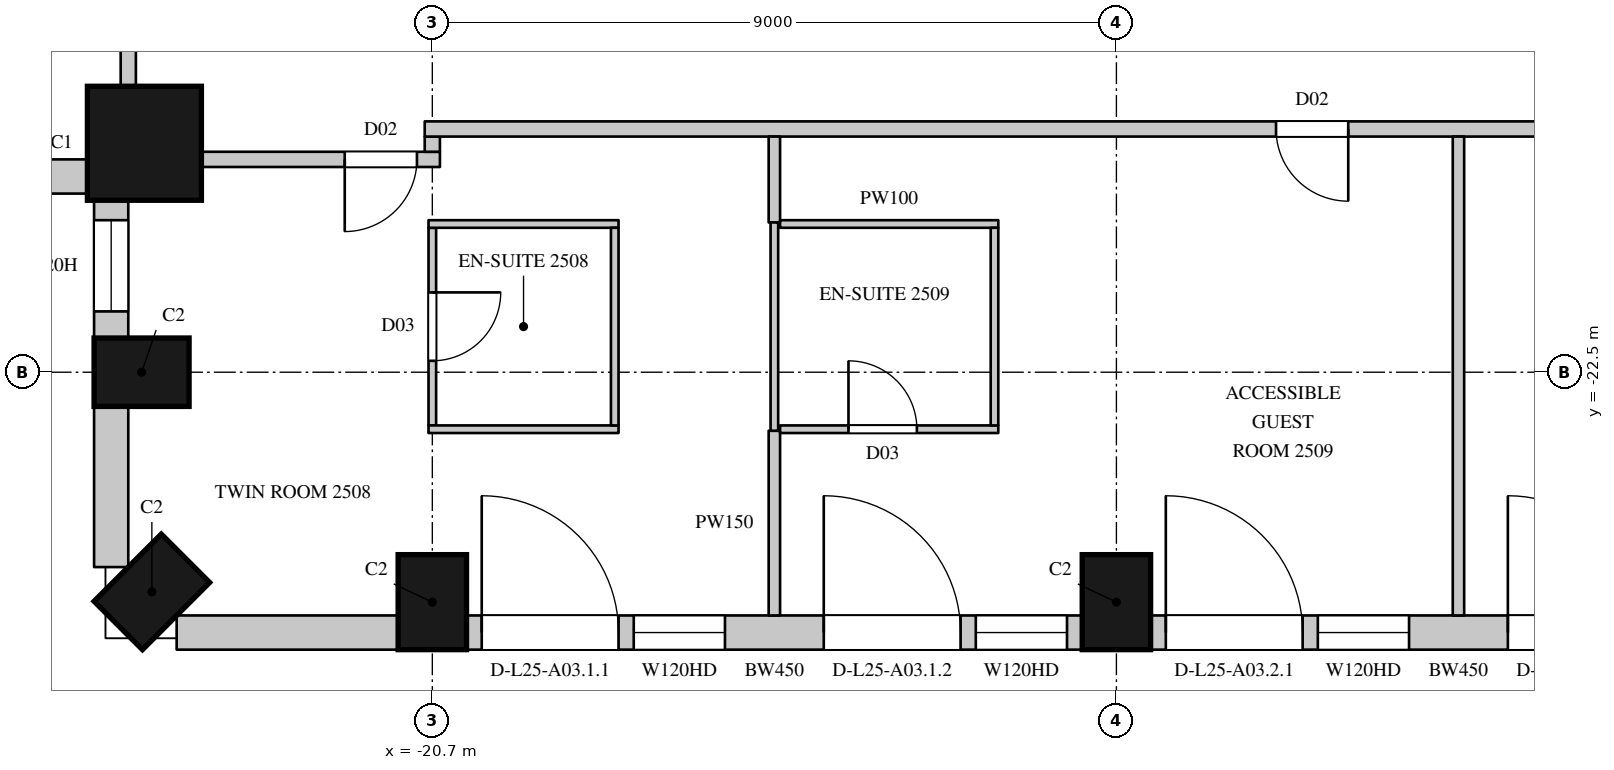
"""IFC4 building model, lengths in metres.
Left out: names, types, materials, properties, quantities, classifications, styles, units other than length and angle.
Written with IfcOpenShell. Run it as: python <this file> out.ifc"""

import sys

from ifc_helpers import new_model, si_unit, direction, frame, frame_2d, origin, origin_2d, place, context, subcontext, project, spatial, rectangle, circle, extrude, element, fill, save


model = new_model("IFC4")
c1 = context("Model", 3, precision=1e-05, world=origin(), true_north=direction((0.0, 1.0)))
c2 = subcontext(c1, "Body", "Model", "MODEL_VIEW")
j1 = project(units=[si_unit("LENGTHUNIT", "METRE"), si_unit("PLANEANGLEUNIT", "RADIAN")], contexts=[c1])
p1 = place(None, origin())
s1 = spatial("IfcSite", under=j1, at=p1, CompositionType="ELEMENT")
p2 = place(p1, origin())
s2 = spatial("IfcBuilding", under=s1, at=p2, CompositionType="ELEMENT")
p3 = place(p2, frame((0.0, 0.0, 120.3)))
s3 = spatial("IfcBuildingStorey", under=s2, at=p3, CompositionType="ELEMENT", Elevation=120.3)
p4 = place(p3, frame((-24.488, -19.488, 0.0), z_axis=(0.0, 0.0, 1.0), x_axis=(1.0, 0.0, 0.0)))
e1 = element("IfcColumn", 1, at=p4, inside=s3, PredefinedType="COLUMN", context=c2, shape_type="SweptSolid", body=[
    extrude(circle(Radius=0.75, at=origin_2d()), origin(), (0.0, 0.0, 1.0), 3.6),
])
for number, where, z_axis, x_axis in (
    (2, (-24.525, -22.5, 0.0), (0.0, 0.0, 1.0), (0.0, -1.0, 0.0)),
    (3, (-24.39, -25.39, 0.0), (0.0, 0.0, 1.0), (0.707, -0.707, 0.0)),
    (4, (-20.7, -25.525, 0.0), (0.0, 0.0, 1.0), (1.0, 0.0, 0.0)),
    (5, (-11.7, -25.525, 0.0), (0.0, 0.0, 1.0), (1.0, 0.0, 0.0)),
):
    element("IfcColumn", number, at=place(p3, frame(where, z_axis=z_axis, x_axis=x_axis)), inside=s3, PredefinedType="COLUMN", context=c2, shape_type="SweptSolid", body=[
        extrude(rectangle(XDim=0.9, YDim=1.25, at=origin_2d()), origin(), (0.0, 0.0, 1.0), 3.6),
    ])
p5 = place(p3, frame((-29.064, -19.925, 0.0), z_axis=(0.0, 0.0, 1.0), x_axis=(1.0, 0.0, 0.0)))
e6 = element("IfcWall", 6, at=p5, inside=s3, PredefinedType="SOLIDWALL", context=c2, shape_type="SweptSolid", body=[
    extrude(rectangle(XDim=3.857, YDim=0.45, at=frame_2d((1.928, 0.0))), origin(), (0.0, 0.0, 1.0), 3.3),
])
p6 = place(p5, frame((0.514, 0.0, 1.05)))
e7 = element("IfcOpeningElement", 7, at=p6, cuts=e6, PredefinedType="OPENING", context=c2, shape_type="SweptSolid", body=[
    extrude(rectangle(XDim=2.7, YDim=2.0, at=frame_2d((1.35, 1.0))), frame((0.0, 0.235, 0.0), z_axis=(0.0, -1.0, 0.0), x_axis=(1.0, 0.0, 0.0)), (0.0, 0.0, 1.0), 0.47),
])
p7 = place(p3, frame((-24.925, -20.207, 0.0), z_axis=(0.0, 0.0, 1.0), x_axis=(0.0, -1.0, 0.0)))
e8 = element("IfcWall", 8, at=p7, inside=s3, PredefinedType="SOLIDWALL", context=c2, shape_type="SweptSolid", body=[
    extrude(rectangle(XDim=1.843, YDim=0.45, at=frame_2d((0.921, 0.0))), origin(), (0.0, 0.0, 1.0), 3.3),
])
p8 = place(p7, frame((0.293, 0.0, 1.05)))
e9 = element("IfcOpeningElement", 9, at=p8, cuts=e8, PredefinedType="OPENING", context=c2, shape_type="SweptSolid", body=[
    extrude(rectangle(XDim=1.2, YDim=2.0, at=frame_2d((0.6, 1.0))), frame((0.0, 0.235, 0.0), z_axis=(0.0, -1.0, 0.0), x_axis=(1.0, 0.0, 0.0)), (0.0, 0.0, 1.0), 0.47),
])
p9 = place(p3, frame((-24.925, -22.95, 0.0), z_axis=(0.0, 0.0, 1.0), x_axis=(0.0, -1.0, 0.0)))
e10 = element("IfcWall", 10, at=p9, inside=s3, PredefinedType="SOLIDWALL", context=c2, shape_type="SweptSolid", body=[
    extrude(rectangle(XDim=2.114, YDim=0.45, at=frame_2d((1.057, 0.0))), origin(), (0.0, 0.0, 1.0), 3.3),
])
p10 = place(p3, frame((-24.064, -25.925, 0.0), z_axis=(0.0, 0.0, 1.0), x_axis=(1.0, 0.0, 0.0)))
e11 = element("IfcWall", 11, at=p10, inside=s3, PredefinedType="SOLIDWALL", context=c2, shape_type="SweptSolid", body=[
    extrude(rectangle(XDim=2.914, YDim=0.45, at=frame_2d((1.457, 0.0))), origin(), (0.0, 0.0, 1.0), 3.3),
])
p11 = place(p3, frame((-20.25, -25.925, 0.0), z_axis=(0.0, 0.0, 1.0), x_axis=(1.0, 0.0, 0.0)))
e12 = element("IfcWall", 12, at=p11, inside=s3, PredefinedType="SOLIDWALL", context=c2, shape_type="SweptSolid", body=[
    extrude(rectangle(XDim=8.1, YDim=0.45, at=frame_2d((4.05, 0.0))), origin(), (0.0, 0.0, 1.0), 3.3),
])
p12 = place(p11, frame((0.2, 0.0, 0.0)))
e13 = element("IfcOpeningElement", 13, at=p12, cuts=e12, PredefinedType="OPENING", context=c2, shape_type="SweptSolid", body=[
    extrude(rectangle(XDim=1.8, YDim=2.4, at=frame_2d((0.9, 1.2))), frame((0.0, 0.235, 0.0), z_axis=(0.0, -1.0, 0.0), x_axis=(1.0, 0.0, 0.0)), (0.0, 0.0, 1.0), 0.47),
])
p13 = place(p11, frame((2.2, 0.0, 1.05)))
e14 = element("IfcOpeningElement", 14, at=p13, cuts=e12, PredefinedType="OPENING", context=c2, shape_type="SweptSolid", body=[
    extrude(rectangle(XDim=1.2, YDim=2.0, at=frame_2d((0.6, 1.0))), frame((0.0, 0.235, 0.0), z_axis=(0.0, -1.0, 0.0), x_axis=(1.0, 0.0, 0.0)), (0.0, 0.0, 1.0), 0.47),
])
p14 = place(p11, frame((4.7, 0.0, 0.0)))
e15 = element("IfcOpeningElement", 15, at=p14, cuts=e12, PredefinedType="OPENING", context=c2, shape_type="SweptSolid", body=[
    extrude(rectangle(XDim=1.8, YDim=2.4, at=frame_2d((0.9, 1.2))), frame((0.0, 0.235, 0.0), z_axis=(0.0, -1.0, 0.0), x_axis=(1.0, 0.0, 0.0)), (0.0, 0.0, 1.0), 0.47),
])
p15 = place(p11, frame((6.7, 0.0, 1.05)))
e16 = element("IfcOpeningElement", 16, at=p15, cuts=e12, PredefinedType="OPENING", context=c2, shape_type="SweptSolid", body=[
    extrude(rectangle(XDim=1.2, YDim=2.0, at=frame_2d((0.6, 1.0))), frame((0.0, 0.235, 0.0), z_axis=(0.0, -1.0, 0.0), x_axis=(1.0, 0.0, 0.0)), (0.0, 0.0, 1.0), 0.47),
])
p16 = place(p3, frame((-11.25, -25.925, 0.0), z_axis=(0.0, 0.0, 1.0), x_axis=(1.0, 0.0, 0.0)))
e17 = element("IfcWall", 17, at=p16, inside=s3, PredefinedType="SOLIDWALL", context=c2, shape_type="SweptSolid", body=[
    extrude(rectangle(XDim=8.1, YDim=0.45, at=frame_2d((4.05, 0.0))), origin(), (0.0, 0.0, 1.0), 3.3),
])
p17 = place(p16, frame((0.2, 0.0, 0.0)))
e18 = element("IfcOpeningElement", 18, at=p17, cuts=e17, PredefinedType="OPENING", context=c2, shape_type="SweptSolid", body=[
    extrude(rectangle(XDim=1.8, YDim=2.4, at=frame_2d((0.9, 1.2))), frame((0.0, 0.235, 0.0), z_axis=(0.0, -1.0, 0.0), x_axis=(1.0, 0.0, 0.0)), (0.0, 0.0, 1.0), 0.47),
])
p18 = place(p16, frame((2.2, 0.0, 1.05)))
e19 = element("IfcOpeningElement", 19, at=p18, cuts=e17, PredefinedType="OPENING", context=c2, shape_type="SweptSolid", body=[
    extrude(rectangle(XDim=1.2, YDim=2.0, at=frame_2d((0.6, 1.0))), frame((0.0, 0.235, 0.0), z_axis=(0.0, -1.0, 0.0), x_axis=(1.0, 0.0, 0.0)), (0.0, 0.0, 1.0), 0.47),
])
p19 = place(p16, frame((4.7, 0.0, 0.0)))
e20 = element("IfcOpeningElement", 20, at=p19, cuts=e17, PredefinedType="OPENING", context=c2, shape_type="SweptSolid", body=[
    extrude(rectangle(XDim=1.8, YDim=2.4, at=frame_2d((0.9, 1.2))), frame((0.0, 0.235, 0.0), z_axis=(0.0, -1.0, 0.0), x_axis=(1.0, 0.0, 0.0)), (0.0, 0.0, 1.0), 0.47),
])
p20 = place(p16, frame((6.7, 0.0, 1.05)))
e21 = element("IfcOpeningElement", 21, at=p20, cuts=e17, PredefinedType="OPENING", context=c2, shape_type="SweptSolid", body=[
    extrude(rectangle(XDim=1.2, YDim=2.0, at=frame_2d((0.6, 1.0))), frame((0.0, 0.235, 0.0), z_axis=(0.0, -1.0, 0.0), x_axis=(1.0, 0.0, 0.0)), (0.0, 0.0, 1.0), 0.47),
])
p21 = place(p3, frame((-24.7, -18.752, 0.0), z_axis=(0.0, 0.0, 1.0), x_axis=(0.0, 1.0, 0.0)))
e22 = element("IfcWall", 22, at=p21, inside=s3, PredefinedType="PARTITIONING", context=c2, shape_type="SweptSolid", body=[
    extrude(rectangle(XDim=2.722, YDim=0.2, at=frame_2d((1.361, 0.0))), origin(), (0.0, 0.0, 1.0), 3.3),
])
p22 = place(p21, frame((0.65, 0.0, 0.0)))
e23 = element("IfcOpeningElement", 23, at=p22, cuts=e22, PredefinedType="OPENING", context=c2, shape_type="SweptSolid", body=[
    extrude(rectangle(XDim=1.6, YDim=2.4, at=frame_2d((0.8, 1.2))), frame((0.0, 0.11, 0.0), z_axis=(0.0, -1.0, 0.0), x_axis=(1.0, 0.0, 0.0)), (0.0, 0.0, 1.0), 0.22),
])
p23 = place(p3, frame((-23.752, -19.7, 0.0), z_axis=(0.0, 0.0, 1.0), x_axis=(1.0, 0.0, 0.0)))
e24 = element("IfcWall", 24, at=p23, inside=s3, PredefinedType="PARTITIONING", context=c2, shape_type="SweptSolid", body=[
    extrude(rectangle(XDim=3.152, YDim=0.2, at=frame_2d((1.576, 0.0))), origin(), (0.0, 0.0, 1.0), 3.3),
])
p24 = place(p23, frame((1.9, 0.0, 0.0)))
e25 = element("IfcOpeningElement", 25, at=p24, cuts=e24, PredefinedType="OPENING", context=c2, shape_type="SweptSolid", body=[
    extrude(rectangle(XDim=0.95, YDim=2.2, at=frame_2d((0.475, 1.1))), frame((0.0, 0.11, 0.0), z_axis=(0.0, -1.0, 0.0), x_axis=(1.0, 0.0, 0.0)), (0.0, 0.0, 1.0), 0.22),
])
p25 = place(p3, frame((-20.7, -19.6, 0.0), z_axis=(0.0, 0.0, 1.0), x_axis=(0.0, 1.0, 0.0)))
e26 = element("IfcWall", 26, at=p25, inside=s3, PredefinedType="PARTITIONING", context=c2, shape_type="SweptSolid", body=[
    extrude(rectangle(XDim=0.2, YDim=0.2, at=frame_2d((0.1, 0.0))), origin(), (0.0, 0.0, 1.0), 3.3),
])
p26 = place(p3, frame((-20.8, -19.3, 0.0), z_axis=(0.0, 0.0, 1.0), x_axis=(1.0, 0.0, 0.0)))
e27 = element("IfcWall", 27, at=p26, inside=s3, PredefinedType="PARTITIONING", context=c2, shape_type="SweptSolid", body=[
    extrude(rectangle(XDim=38.6, YDim=0.2, at=frame_2d((19.3, 0.0))), origin(), (0.0, 0.0, 1.0), 3.3),
])
p27 = place(p26, frame((11.2, 0.0, 0.0)))
e28 = element("IfcOpeningElement", 28, at=p27, cuts=e27, PredefinedType="OPENING", context=c2, shape_type="SweptSolid", body=[
    extrude(rectangle(XDim=0.95, YDim=2.2, at=frame_2d((0.475, 1.1))), frame((0.0, 0.11, 0.0), z_axis=(0.0, -1.0, 0.0), x_axis=(1.0, 0.0, 0.0)), (0.0, 0.0, 1.0), 0.22),
])
p28 = place(p26, frame((15.05, 0.0, 0.0)))
e29 = element("IfcOpeningElement", 29, at=p28, cuts=e27, PredefinedType="OPENING", context=c2, shape_type="SweptSolid", body=[
    extrude(rectangle(XDim=0.95, YDim=2.2, at=frame_2d((0.475, 1.1))), frame((0.0, 0.11, 0.0), z_axis=(0.0, -1.0, 0.0), x_axis=(1.0, 0.0, 0.0)), (0.0, 0.0, 1.0), 0.22),
])
p29 = place(p26, frame((29.2, 0.0, 0.0)))
e30 = element("IfcOpeningElement", 30, at=p29, cuts=e27, PredefinedType="OPENING", context=c2, shape_type="SweptSolid", body=[
    extrude(rectangle(XDim=0.95, YDim=2.2, at=frame_2d((0.475, 1.1))), frame((0.0, 0.11, 0.0), z_axis=(0.0, -1.0, 0.0), x_axis=(1.0, 0.0, 0.0)), (0.0, 0.0, 1.0), 0.22),
])
p30 = place(p26, frame((33.05, 0.0, 0.0)))
e31 = element("IfcOpeningElement", 31, at=p30, cuts=e27, PredefinedType="OPENING", context=c2, shape_type="SweptSolid", body=[
    extrude(rectangle(XDim=0.95, YDim=2.2, at=frame_2d((0.475, 1.1))), frame((0.0, 0.11, 0.0), z_axis=(0.0, -1.0, 0.0), x_axis=(1.0, 0.0, 0.0)), (0.0, 0.0, 1.0), 0.22),
])
p31 = place(p3, frame((-16.2, -25.7, 0.0), z_axis=(0.0, 0.0, 1.0), x_axis=(0.0, 1.0, 0.0)))
e32 = element("IfcWall", 32, at=p31, inside=s3, PredefinedType="PARTITIONING", context=c2, shape_type="SweptSolid", body=[
    extrude(rectangle(XDim=2.43, YDim=0.15, at=frame_2d((1.215, 0.0))), origin(), (0.0, 0.0, 1.0), 2.65),
])
p32 = place(p3, frame((-16.2, -20.53, 0.0), z_axis=(0.0, 0.0, 1.0), x_axis=(0.0, 1.0, 0.0)))
e33 = element("IfcWall", 33, at=p32, inside=s3, PredefinedType="PARTITIONING", context=c2, shape_type="SweptSolid", body=[
    extrude(rectangle(XDim=1.13, YDim=0.15, at=frame_2d((0.565, 0.0))), origin(), (0.0, 0.0, 1.0), 2.65),
])
p33 = place(p3, frame((-7.2, -25.7, 0.0), z_axis=(0.0, 0.0, 1.0), x_axis=(0.0, 1.0, 0.0)))
e34 = element("IfcWall", 34, at=p33, inside=s3, PredefinedType="PARTITIONING", context=c2, shape_type="SweptSolid", body=[
    extrude(rectangle(XDim=6.3, YDim=0.15, at=frame_2d((3.15, 0.0))), origin(), (0.0, 0.0, 1.0), 2.65),
])
p34 = place(p3, frame((-20.7, -23.2, 0.0), z_axis=(0.0, 0.0, 1.0), x_axis=(0.0, 1.0, 0.0)))
e35 = element("IfcWall", 35, at=p34, inside=s3, PredefinedType="PARTITIONING", context=c2, shape_type="SweptSolid", body=[
    extrude(rectangle(XDim=2.6, YDim=0.1, at=frame_2d((1.3, 0.0))), origin(), (0.0, 0.0, 1.0), 2.75),
])
p35 = place(p34, frame((0.85, 0.0, 0.0)))
e36 = element("IfcOpeningElement", 36, at=p35, cuts=e35, PredefinedType="OPENING", context=c2, shape_type="SweptSolid", body=[
    extrude(rectangle(XDim=0.9, YDim=2.2, at=frame_2d((0.45, 1.1))), frame((0.0, 0.06, 0.0), z_axis=(0.0, -1.0, 0.0), x_axis=(1.0, 0.0, 0.0)), (0.0, 0.0, 1.0), 0.12),
])
for number, where, z_axis, x_axis in (
    (37, (-20.75, -23.25, 0.0), (0.0, 0.0, 1.0), (1.0, 0.0, 0.0)),
    (38, (-20.75, -20.55, 0.0), (0.0, 0.0, 1.0), (1.0, 0.0, 0.0)),
):
    element("IfcWall", number, at=place(p3, frame(where, z_axis=z_axis, x_axis=x_axis)), inside=s3, PredefinedType="PARTITIONING", context=c2, shape_type="SweptSolid", body=[
        extrude(rectangle(XDim=2.5, YDim=0.1, at=frame_2d((1.25, 0.0))), origin(), (0.0, 0.0, 1.0), 3.3),
    ])
p36 = place(p3, frame((-18.3, -23.2, 0.0), z_axis=(0.0, 0.0, 1.0), x_axis=(0.0, 1.0, 0.0)))
e39 = element("IfcWall", 39, at=p36, inside=s3, PredefinedType="PARTITIONING", context=c2, shape_type="SweptSolid", body=[
    extrude(rectangle(XDim=2.6, YDim=0.1, at=frame_2d((1.3, 0.0))), origin(), (0.0, 0.0, 1.0), 3.3),
])
p37 = place(p3, frame((-16.2, -23.27, 0.0), z_axis=(0.0, 0.0, 1.0), x_axis=(0.0, 1.0, 0.0)))
e40 = element("IfcWall", 40, at=p37, inside=s3, PredefinedType="PARTITIONING", context=c2, shape_type="SweptSolid", body=[
    extrude(rectangle(XDim=2.74, YDim=0.1, at=frame_2d((1.37, 0.0))), origin(), (0.0, 0.0, 1.0), 2.65),
])
p38 = place(p3, frame((-16.125, -23.25, 0.0), z_axis=(0.0, 0.0, 1.0), x_axis=(1.0, 0.0, 0.0)))
e41 = element("IfcWall", 41, at=p38, inside=s3, PredefinedType="PARTITIONING", context=c2, shape_type="SweptSolid", body=[
    extrude(rectangle(XDim=2.871, YDim=0.1, at=frame_2d((1.436, 0.0))), origin(), (0.0, 0.0, 1.0), 3.3),
])
p39 = place(p38, frame((0.9, 0.0, 0.0)))
e42 = element("IfcOpeningElement", 42, at=p39, cuts=e41, PredefinedType="OPENING", context=c2, shape_type="SweptSolid", body=[
    extrude(rectangle(XDim=0.9, YDim=2.2, at=frame_2d((0.45, 1.1))), frame((0.0, 0.06, 0.0), z_axis=(0.0, -1.0, 0.0), x_axis=(1.0, 0.0, 0.0)), (0.0, 0.0, 1.0), 0.12),
])
p40 = place(p3, frame((-16.125, -20.55, 0.0), z_axis=(0.0, 0.0, 1.0), x_axis=(1.0, 0.0, 0.0)))
e43 = element("IfcWall", 43, at=p40, inside=s3, PredefinedType="PARTITIONING", context=c2, shape_type="SweptSolid", body=[
    extrude(rectangle(XDim=2.871, YDim=0.1, at=frame_2d((1.436, 0.0))), origin(), (0.0, 0.0, 1.0), 3.3),
])
p41 = place(p3, frame((-13.304, -23.2, 0.0), z_axis=(0.0, 0.0, 1.0), x_axis=(0.0, 1.0, 0.0)))
e44 = element("IfcWall", 44, at=p41, inside=s3, PredefinedType="PARTITIONING", context=c2, shape_type="SweptSolid", body=[
    extrude(rectangle(XDim=2.6, YDim=0.1, at=frame_2d((1.3, 0.0))), origin(), (0.0, 0.0, 1.0), 3.3),
])
p42 = place(p8, origin())
e45 = element("IfcWindow", 45, at=p42, inside=s3, PartitioningType="SINGLE_PANEL", PredefinedType="WINDOW", context=c2, shape_type="SweptSolid", body=[
    extrude(rectangle(XDim=1.2, YDim=2.0, at=frame_2d((0.6, 1.0))), frame((0.0, 0.135, 0.0), z_axis=(0.0, -1.0, 0.0), x_axis=(1.0, 0.0, 0.0)), (0.0, 0.0, 1.0), 0.06),
])
fill(e9, e45)
p43 = place(p12, origin())
e46 = element("IfcDoor", 46, at=p43, inside=s3, OperationType="SLIDING_TO_LEFT", PredefinedType="DOOR", context=c2, shape_type="SweptSolid", body=[
    extrude(rectangle(XDim=1.8, YDim=2.4, at=frame_2d((0.9, 1.2))), frame((0.0, 0.13, 0.0), z_axis=(0.0, -1.0, 0.0), x_axis=(1.0, 0.0, 0.0)), (0.0, 0.0, 1.0), 0.05),
])
fill(e13, e46)
p44 = place(p13, origin())
e47 = element("IfcWindow", 47, at=p44, inside=s3, PartitioningType="SINGLE_PANEL", PredefinedType="WINDOW", context=c2, shape_type="SweptSolid", body=[
    extrude(rectangle(XDim=1.2, YDim=2.0, at=frame_2d((0.6, 1.0))), frame((0.0, 0.135, 0.0), z_axis=(0.0, -1.0, 0.0), x_axis=(1.0, 0.0, 0.0)), (0.0, 0.0, 1.0), 0.06),
])
fill(e14, e47)
p45 = place(p14, origin())
e48 = element("IfcDoor", 48, at=p45, inside=s3, OperationType="SLIDING_TO_LEFT", PredefinedType="DOOR", context=c2, shape_type="SweptSolid", body=[
    extrude(rectangle(XDim=1.8, YDim=2.4, at=frame_2d((0.9, 1.2))), frame((0.0, 0.13, 0.0), z_axis=(0.0, -1.0, 0.0), x_axis=(1.0, 0.0, 0.0)), (0.0, 0.0, 1.0), 0.05),
])
fill(e15, e48)
p46 = place(p15, origin())
e49 = element("IfcWindow", 49, at=p46, inside=s3, PartitioningType="SINGLE_PANEL", PredefinedType="WINDOW", context=c2, shape_type="SweptSolid", body=[
    extrude(rectangle(XDim=1.2, YDim=2.0, at=frame_2d((0.6, 1.0))), frame((0.0, 0.135, 0.0), z_axis=(0.0, -1.0, 0.0), x_axis=(1.0, 0.0, 0.0)), (0.0, 0.0, 1.0), 0.06),
])
fill(e16, e49)
p47 = place(p17, origin())
e50 = element("IfcDoor", 50, at=p47, inside=s3, OperationType="SLIDING_TO_LEFT", PredefinedType="DOOR", context=c2, shape_type="SweptSolid", body=[
    extrude(rectangle(XDim=1.8, YDim=2.4, at=frame_2d((0.9, 1.2))), frame((0.0, 0.13, 0.0), z_axis=(0.0, -1.0, 0.0), x_axis=(1.0, 0.0, 0.0)), (0.0, 0.0, 1.0), 0.05),
])
fill(e18, e50)
p48 = place(p18, origin())
e51 = element("IfcWindow", 51, at=p48, inside=s3, PartitioningType="SINGLE_PANEL", PredefinedType="WINDOW", context=c2, shape_type="SweptSolid", body=[
    extrude(rectangle(XDim=1.2, YDim=2.0, at=frame_2d((0.6, 1.0))), frame((0.0, 0.135, 0.0), z_axis=(0.0, -1.0, 0.0), x_axis=(1.0, 0.0, 0.0)), (0.0, 0.0, 1.0), 0.06),
])
fill(e19, e51)
p49 = place(p19, origin())
e52 = element("IfcDoor", 52, at=p49, inside=s3, OperationType="SLIDING_TO_LEFT", PredefinedType="DOOR", context=c2, shape_type="SweptSolid", body=[
    extrude(rectangle(XDim=1.8, YDim=2.4, at=frame_2d((0.9, 1.2))), frame((0.0, 0.13, 0.0), z_axis=(0.0, -1.0, 0.0), x_axis=(1.0, 0.0, 0.0)), (0.0, 0.0, 1.0), 0.05),
])
fill(e20, e52)
p50 = place(p24, origin())
e53 = element("IfcDoor", 53, at=p50, inside=s3, OperationType="SINGLE_SWING_RIGHT", PredefinedType="DOOR", context=c2, shape_type="SweptSolid", body=[
    extrude(rectangle(XDim=0.95, YDim=2.2, at=frame_2d((0.475, 1.1))), frame((0.0, 0.025, 0.0), z_axis=(0.0, -1.0, 0.0), x_axis=(1.0, 0.0, 0.0)), (0.0, 0.0, 1.0), 0.05),
])
fill(e25, e53)
p51 = place(p35, origin())
e54 = element("IfcDoor", 54, at=p51, inside=s3, OperationType="SINGLE_SWING_LEFT", PredefinedType="DOOR", context=c2, shape_type="SweptSolid", body=[
    extrude(rectangle(XDim=0.9, YDim=2.2, at=frame_2d((0.45, 1.1))), frame((0.0, 0.025, 0.0), z_axis=(0.0, -1.0, 0.0), x_axis=(1.0, 0.0, 0.0)), (0.0, 0.0, 1.0), 0.05),
])
fill(e36, e54)
p52 = place(p27, origin())
e55 = element("IfcDoor", 55, at=p52, inside=s3, OperationType="SINGLE_SWING_LEFT", PredefinedType="DOOR", context=c2, shape_type="SweptSolid", body=[
    extrude(rectangle(XDim=0.95, YDim=2.2, at=frame_2d((0.475, 1.1))), frame((0.0, 0.025, 0.0), z_axis=(0.0, -1.0, 0.0), x_axis=(1.0, 0.0, 0.0)), (0.0, 0.0, 1.0), 0.05),
])
fill(e28, e55)
p53 = place(p39, origin())
e56 = element("IfcDoor", 56, at=p53, inside=s3, OperationType="SINGLE_SWING_LEFT", PredefinedType="DOOR", context=c2, shape_type="SweptSolid", body=[
    extrude(rectangle(XDim=0.9, YDim=2.2, at=frame_2d((0.45, 1.1))), frame((0.0, 0.025, 0.0), z_axis=(0.0, -1.0, 0.0), x_axis=(1.0, 0.0, 0.0)), (0.0, 0.0, 1.0), 0.05),
])
fill(e42, e56)
save(model, sys.argv[1])
